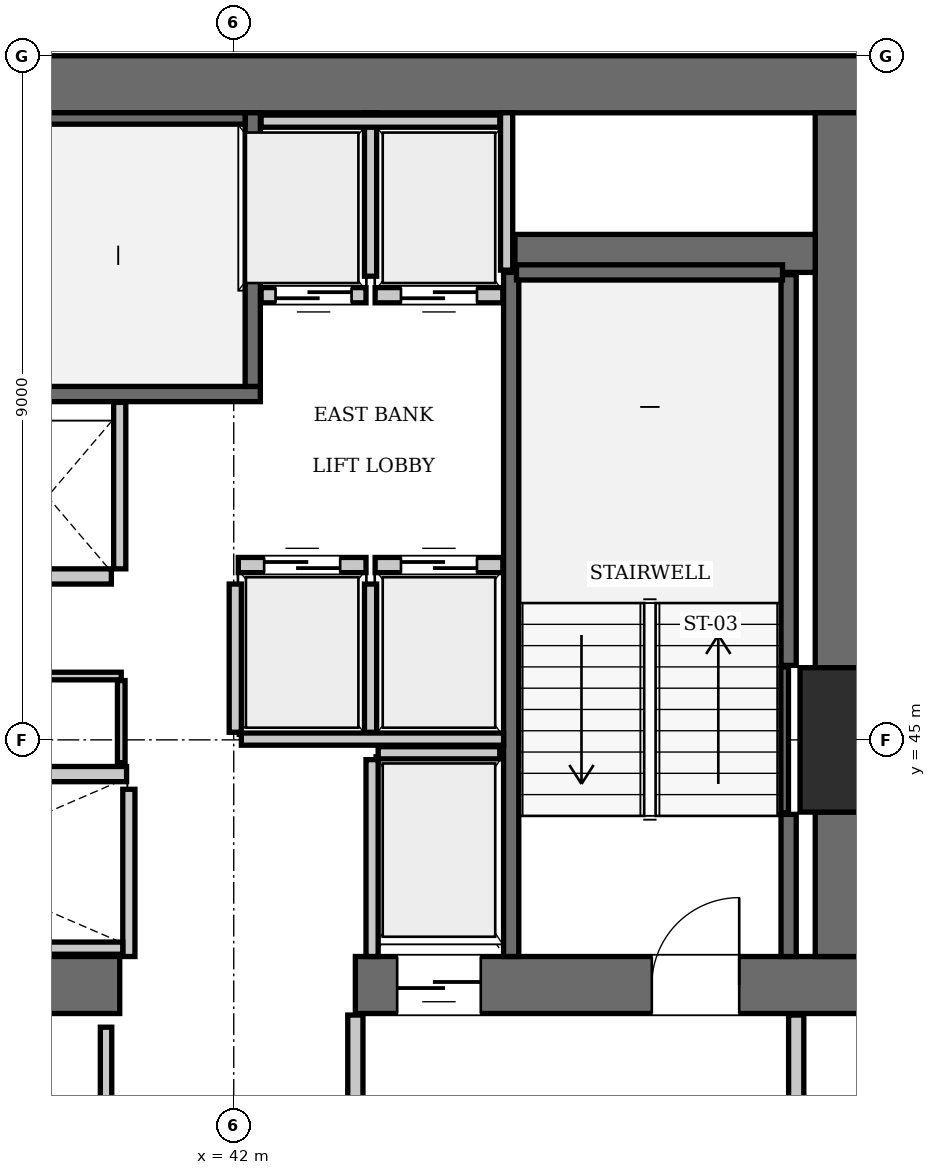
"""IFC4 building model, lengths in metres.
Left out: names, types, materials, properties, quantities, classifications, styles, units other than length and angle.
Written with IfcOpenShell. Run it as: python <this file> out.ifc"""

import sys

from ifc_helpers import new_model, si_unit, direction, frame, frame_2d, origin, origin_2d, place, context, subcontext, project, spatial, rectangle, extrude, element, fill, save


model = new_model("IFC4")
c1 = context("Model", 3, precision=1e-05, world=origin(), true_north=direction((0.0, 1.0)))
c2 = subcontext(c1, "Body", "Model", "MODEL_VIEW")
j1 = project(units=[si_unit("LENGTHUNIT", "METRE"), si_unit("PLANEANGLEUNIT", "RADIAN")], contexts=[c1])
p1 = place(None, origin())
s1 = spatial("IfcSite", under=j1, at=p1, CompositionType="ELEMENT")
p2 = place(p1, origin())
s2 = spatial("IfcBuilding", under=s1, at=p2, CompositionType="ELEMENT")
p3 = place(p2, frame((0.0, 0.0, 138.95)))
s3 = spatial("IfcBuildingStorey", under=s2, at=p3, CompositionType="ELEMENT", Elevation=138.95)
p4 = place(p3, frame((50.4, 45.0, 0.0), z_axis=(0.0, 0.0, 1.0), x_axis=(1.0, 0.0, 0.0)))
e1 = element("IfcColumn", 1, at=p4, inside=s3, PredefinedType="COLUMN", context=c2, shape_type="SweptSolid", body=[
    extrude(rectangle(XDim=1.9, YDim=1.9, at=origin_2d()), origin(), (0.0, 0.0, 1.0), 3.85),
])
p5 = place(p3, frame((25.2, 53.625, 0.0), z_axis=(0.0, 0.0, 1.0), x_axis=(1.0, 0.0, 0.0)))
e2 = element("IfcWall", 2, at=p5, inside=s3, PredefinedType="SHEAR", context=c2, shape_type="SweptSolid", body=[
    extrude(rectangle(XDim=25.2, YDim=0.75, at=frame_2d((12.6, 0.0))), origin(), (0.0, 0.0, 1.0), 3.85),
])
p6 = place(p3, frame((35.1, 41.775, 0.0), z_axis=(0.0, 0.0, 1.0), x_axis=(1.0, 0.0, 0.0)))
e3 = element("IfcWall", 3, at=p6, inside=s3, PredefinedType="SHEAR", context=c2, shape_type="SweptSolid", body=[
    extrude(rectangle(XDim=5.4, YDim=0.75, at=frame_2d((2.7, 0.0))), origin(), (0.0, 0.0, 1.0), 3.85),
])
p7 = place(p3, frame((43.6, 41.775, 0.0), z_axis=(0.0, 0.0, 1.0), x_axis=(1.0, 0.0, 0.0)))
e4 = element("IfcWall", 4, at=p7, inside=s3, PredefinedType="SHEAR", context=c2, shape_type="SweptSolid", body=[
    extrude(rectangle(XDim=6.8, YDim=0.75, at=frame_2d((3.4, 0.0))), origin(), (0.0, 0.0, 1.0), 3.85),
])
p8 = place(p7, frame((3.9, 0.0, 0.0)))
e5 = element("IfcOpeningElement", 5, at=p8, cuts=e4, PredefinedType="OPENING", context=c2, shape_type="SweptSolid", body=[
    extrude(rectangle(XDim=1.15, YDim=2.15, at=frame_2d((0.575, 1.075))), frame((0.0, 0.385, 0.0), z_axis=(0.0, -1.0, 0.0), x_axis=(1.0, 0.0, 0.0)), (0.0, 0.0, 1.0), 0.77),
])
p9 = place(p7, frame((0.55, 0.0, 0.0)))
e6 = element("IfcOpeningElement", 6, at=p9, cuts=e4, PredefinedType="OPENING", context=c2, shape_type="SweptSolid", body=[
    extrude(rectangle(XDim=1.1, YDim=2.2, at=frame_2d((0.55, 1.1))), frame((0.0, 0.385, 0.0), z_axis=(0.0, -1.0, 0.0), x_axis=(1.0, 0.0, 0.0)), (0.0, 0.0, 1.0), 0.77),
])
p10 = place(p3, frame((50.025, 42.15, 0.0), z_axis=(0.0, 0.0, 1.0), x_axis=(0.0, 1.0, 0.0)))
e7 = element("IfcWall", 7, at=p10, inside=s3, PredefinedType="SHEAR", context=c2, shape_type="SweptSolid", body=[
    extrude(rectangle(XDim=1.9, YDim=0.75, at=frame_2d((0.95, 0.0))), origin(), (0.0, 0.0, 1.0), 3.85),
])
p11 = place(p3, frame((50.025, 45.95, 0.0), z_axis=(0.0, 0.0, 1.0), x_axis=(0.0, 1.0, 0.0)))
e8 = element("IfcWall", 8, at=p11, inside=s3, PredefinedType="SHEAR", context=c2, shape_type="SweptSolid", body=[
    extrude(rectangle(XDim=7.3, YDim=0.75, at=frame_2d((3.65, 0.0))), origin(), (0.0, 0.0, 1.0), 3.85),
])
p12 = place(p3, frame((45.7, 51.4, 0.0), z_axis=(0.0, 0.0, 1.0), x_axis=(1.0, 0.0, 0.0)))
e9 = element("IfcWall", 9, at=p12, inside=s3, PredefinedType="SHEAR", context=c2, shape_type="SweptSolid", body=[
    extrude(rectangle(XDim=3.95, YDim=0.5, at=frame_2d((1.975, 0.0))), origin(), (0.0, 0.0, 1.0), 3.85),
])
p13 = place(p3, frame((33.25, 49.55, 0.0), z_axis=(0.0, 0.0, 1.0), x_axis=(1.0, 0.0, 0.0)))
e10 = element("IfcWall", 10, at=p13, inside=s3, PredefinedType="SOLIDWALL", context=c2, shape_type="SweptSolid", body=[
    extrude(rectangle(XDim=9.1, YDim=0.2, at=frame_2d((4.55, 0.0))), origin(), (0.0, 0.0, 1.0), 3.61),
])
p14 = place(p3, frame((42.25, 49.65, 0.0), z_axis=(0.0, 0.0, 1.0), x_axis=(0.0, 1.0, 0.0)))
e11 = element("IfcWall", 11, at=p14, inside=s3, PredefinedType="SOLIDWALL", context=c2, shape_type="SweptSolid", body=[
    extrude(rectangle(XDim=3.6, YDim=0.2, at=frame_2d((1.8, 0.0))), origin(), (0.0, 0.0, 1.0), 3.61),
])
p15 = place(p3, frame((33.45, 53.175, 0.0), z_axis=(0.0, 0.0, 1.0), x_axis=(1.0, 0.0, 0.0)))
e12 = element("IfcWall", 12, at=p15, inside=s3, PredefinedType="SOLIDWALL", context=c2, shape_type="SweptSolid", body=[
    extrude(rectangle(XDim=8.7, YDim=0.15, at=frame_2d((4.35, 0.0))), origin(), (0.0, 0.0, 1.0), 3.61),
])
p16 = place(p3, frame((45.65, 42.15, 0.0), z_axis=(0.0, 0.0, 1.0), x_axis=(0.0, 1.0, 0.0)))
e13 = element("IfcWall", 13, at=p16, inside=s3, PredefinedType="SOLIDWALL", context=c2, shape_type="SweptSolid", body=[
    extrude(rectangle(XDim=9.0, YDim=0.2, at=frame_2d((4.5, 0.0))), origin(), (0.0, 0.0, 1.0), 3.61),
])
p17 = place(p3, frame((49.3, 42.15, 0.0), z_axis=(0.0, 0.0, 1.0), x_axis=(0.0, 1.0, 0.0)))
e14 = element("IfcWall", 14, at=p17, inside=s3, PredefinedType="SOLIDWALL", context=c2, shape_type="SweptSolid", body=[
    extrude(rectangle(XDim=1.87, YDim=0.2, at=frame_2d((0.935, 0.0))), origin(), (0.0, 0.0, 1.0), 3.61),
])
p18 = place(p3, frame((49.3, 45.98, 0.0), z_axis=(0.0, 0.0, 1.0), x_axis=(0.0, 1.0, 0.0)))
e15 = element("IfcWall", 15, at=p18, inside=s3, PredefinedType="SOLIDWALL", context=c2, shape_type="SweptSolid", body=[
    extrude(rectangle(XDim=5.14, YDim=0.2, at=frame_2d((2.57, 0.0))), origin(), (0.0, 0.0, 1.0), 3.61),
])
p19 = place(p3, frame((45.72, 51.15, 0.0), z_axis=(0.0, 0.0, 1.0), x_axis=(1.0, 0.0, 0.0)))
e16 = element("IfcWall", 16, at=p19, inside=s3, PredefinedType="SOLIDWALL", context=c2, shape_type="SweptSolid", body=[
    extrude(rectangle(XDim=3.5, YDim=0.2, at=frame_2d((1.75, 0.0))), origin(), (0.0, 0.0, 1.0), 3.61),
])
p20 = place(p3, frame((49.248, 44.04, 0.0), z_axis=(0.0, 0.0, 1.0), x_axis=(0.0, 1.0, 0.0)))
e17 = element("IfcWall", 17, at=p20, inside=s3, PredefinedType="SOLIDWALL", context=c2, shape_type="SweptSolid", body=[
    extrude(rectangle(XDim=1.92, YDim=0.1, at=frame_2d((0.96, 0.0))), origin(), (0.0, 0.0, 1.0), 3.61),
])
p21 = place(p3, frame((42.06, 47.3, 0.0), z_axis=(0.0, 0.0, 1.0), x_axis=(1.0, 0.0, 0.0)))
e18 = element("IfcWall", 18, at=p21, inside=s3, PredefinedType="SOLIDWALL", context=c2, shape_type="SweptSolid", body=[
    extrude(rectangle(XDim=1.68, YDim=0.2, at=frame_2d((0.84, 0.0))), origin(), (0.0, 0.0, 1.0), 3.61),
])
p22 = place(p21, frame((0.34, 0.0, 0.0)))
e19 = element("IfcOpeningElement", 19, at=p22, cuts=e18, PredefinedType="OPENING", context=c2, shape_type="SweptSolid", body=[
    extrude(rectangle(XDim=1.0, YDim=2.15, at=frame_2d((0.5, 1.075))), frame((0.0, 0.11, 0.0), z_axis=(0.0, -1.0, 0.0), x_axis=(1.0, 0.0, 0.0)), (0.0, 0.0, 1.0), 0.22),
])
p23 = place(p3, frame((43.86, 47.3, 0.0), z_axis=(0.0, 0.0, 1.0), x_axis=(1.0, 0.0, 0.0)))
e20 = element("IfcWall", 20, at=p23, inside=s3, PredefinedType="SOLIDWALL", context=c2, shape_type="SweptSolid", body=[
    extrude(rectangle(XDim=1.68, YDim=0.2, at=frame_2d((0.84, 0.0))), origin(), (0.0, 0.0, 1.0), 3.61),
])
p24 = place(p23, frame((0.34, 0.0, 0.0)))
e21 = element("IfcOpeningElement", 21, at=p24, cuts=e20, PredefinedType="OPENING", context=c2, shape_type="SweptSolid", body=[
    extrude(rectangle(XDim=1.0, YDim=2.15, at=frame_2d((0.5, 1.075))), frame((0.0, 0.11, 0.0), z_axis=(0.0, -1.0, 0.0), x_axis=(1.0, 0.0, 0.0)), (0.0, 0.0, 1.0), 0.22),
])
p25 = place(p3, frame((42.36, 50.85, 0.0), z_axis=(0.0, 0.0, 1.0), x_axis=(1.0, 0.0, 0.0)))
e22 = element("IfcWall", 22, at=p25, inside=s3, PredefinedType="SOLIDWALL", context=c2, shape_type="SweptSolid", body=[
    extrude(rectangle(XDim=1.38, YDim=0.2, at=frame_2d((0.69, 0.0))), origin(), (0.0, 0.0, 1.0), 3.61),
])
p26 = place(p25, frame((0.19, 0.0, 0.0)))
e23 = element("IfcOpeningElement", 23, at=p26, cuts=e22, PredefinedType="OPENING", context=c2, shape_type="SweptSolid", body=[
    extrude(rectangle(XDim=1.0, YDim=2.15, at=frame_2d((0.5, 1.075))), frame((0.0, 0.11, 0.0), z_axis=(0.0, -1.0, 0.0), x_axis=(1.0, 0.0, 0.0)), (0.0, 0.0, 1.0), 0.22),
])
p27 = place(p3, frame((43.86, 50.85, 0.0), z_axis=(0.0, 0.0, 1.0), x_axis=(1.0, 0.0, 0.0)))
e24 = element("IfcWall", 24, at=p27, inside=s3, PredefinedType="SOLIDWALL", context=c2, shape_type="SweptSolid", body=[
    extrude(rectangle(XDim=1.68, YDim=0.2, at=frame_2d((0.84, 0.0))), origin(), (0.0, 0.0, 1.0), 3.61),
])
p28 = place(p27, frame((0.34, 0.0, 0.0)))
e25 = element("IfcOpeningElement", 25, at=p28, cuts=e24, PredefinedType="OPENING", context=c2, shape_type="SweptSolid", body=[
    extrude(rectangle(XDim=1.0, YDim=2.15, at=frame_2d((0.5, 1.075))), frame((0.0, 0.11, 0.0), z_axis=(0.0, -1.0, 0.0), x_axis=(1.0, 0.0, 0.0)), (0.0, 0.0, 1.0), 0.22),
])
p29 = place(p3, frame((38.91, 44.55, 0.0), z_axis=(0.0, 0.0, 1.0), x_axis=(1.0, 0.0, 0.0)))
e26 = element("IfcWall", 26, at=p29, inside=s3, PredefinedType="SOLIDWALL", context=c2, shape_type="SweptSolid", body=[
    extrude(rectangle(XDim=1.68, YDim=0.2, at=frame_2d((0.84, 0.0))), origin(), (0.0, 0.0, 1.0), 3.61),
])
p30 = place(p3, frame((38.71, 47.15, 0.0), z_axis=(0.0, 0.0, 1.0), x_axis=(1.0, 0.0, 0.0)))
e27 = element("IfcWall", 27, at=p30, inside=s3, PredefinedType="SOLIDWALL", context=c2, shape_type="SweptSolid", body=[
    extrude(rectangle(XDim=1.68, YDim=0.2, at=frame_2d((0.84, 0.0))), origin(), (0.0, 0.0, 1.0), 3.61),
])
p31 = place(p3, frame((43.9, 44.83, 0.0), z_axis=(0.0, 0.0, 1.0), x_axis=(1.0, 0.0, 0.0)))
e28 = element("IfcWall", 28, at=p31, inside=s3, PredefinedType="SOLIDWALL", context=c2, shape_type="SweptSolid", body=[
    extrude(rectangle(XDim=1.6, YDim=0.16, at=frame_2d((0.8, 0.0))), origin(), (0.0, 0.0, 1.0), 3.61),
])
p32 = place(p3, frame((43.82, 42.15, 0.0), z_axis=(0.0, 0.0, 1.0), x_axis=(0.0, 1.0, 0.0)))
e29 = element("IfcWall", 29, at=p32, inside=s3, PredefinedType="SOLIDWALL", context=c2, shape_type="SweptSolid", body=[
    extrude(rectangle(XDim=2.59, YDim=0.16, at=frame_2d((1.295, 0.0))), origin(), (0.0, 0.0, 1.0), 3.61),
])
for number, where, z_axis, x_axis in (
    (30, (42.02, 45.1, 0.0), (0.0, 0.0, 1.0), (0.0, 1.0, 0.0)),
    (31, (43.8, 45.1, 0.0), (0.0, 0.0, 1.0), (0.0, 1.0, 0.0)),
):
    element("IfcWall", number, at=place(p3, frame(where, z_axis=z_axis, x_axis=x_axis)), inside=s3, PredefinedType="SOLIDWALL", context=c2, shape_type="SweptSolid", body=[
        extrude(rectangle(XDim=1.95, YDim=0.16, at=frame_2d((0.975, 0.0))), origin(), (0.0, 0.0, 1.0), 3.61),
    ])
p33 = place(p3, frame((42.1, 45.01, 0.0), z_axis=(0.0, 0.0, 1.0), x_axis=(1.0, 0.0, 0.0)))
e32 = element("IfcWall", 32, at=p33, inside=s3, PredefinedType="SOLIDWALL", context=c2, shape_type="SweptSolid", body=[
    extrude(rectangle(XDim=3.45, YDim=0.16, at=frame_2d((1.725, 0.0))), origin(), (0.0, 0.0, 1.0), 3.61),
])
p34 = place(p3, frame((45.59, 51.18, 0.0), z_axis=(0.0, 0.0, 1.0), x_axis=(0.0, 1.0, 0.0)))
e33 = element("IfcWall", 33, at=p34, inside=s3, PredefinedType="SOLIDWALL", context=c2, shape_type="SweptSolid", body=[
    extrude(rectangle(XDim=2.07, YDim=0.16, at=frame_2d((1.035, 0.0))), origin(), (0.0, 0.0, 1.0), 3.61),
])
p35 = place(p3, frame((43.8, 51.1, 0.0), z_axis=(0.0, 0.0, 1.0), x_axis=(0.0, 1.0, 0.0)))
e34 = element("IfcWall", 34, at=p35, inside=s3, PredefinedType="SOLIDWALL", context=c2, shape_type="SweptSolid", body=[
    extrude(rectangle(XDim=2.15, YDim=0.16, at=frame_2d((1.075, 0.0))), origin(), (0.0, 0.0, 1.0), 3.61),
])
p36 = place(p3, frame((42.36, 53.14, 0.0), z_axis=(0.0, 0.0, 1.0), x_axis=(1.0, 0.0, 0.0)))
e35 = element("IfcWall", 35, at=p36, inside=s3, PredefinedType="SOLIDWALL", context=c2, shape_type="SweptSolid", body=[
    extrude(rectangle(XDim=3.14, YDim=0.16, at=frame_2d((1.57, 0.0))), origin(), (0.0, 0.0, 1.0), 3.61),
])
p37 = place(p3, frame((40.62, 42.15, 0.0), z_axis=(0.0, 0.0, 1.0), x_axis=(0.0, 1.0, 0.0)))
e36 = element("IfcWall", 36, at=p37, inside=s3, PredefinedType="SOLIDWALL", context=c2, shape_type="SweptSolid", body=[
    extrude(rectangle(XDim=2.2, YDim=0.16, at=frame_2d((1.1, 0.0))), origin(), (0.0, 0.0, 1.0), 3.61),
])
p38 = place(p3, frame((35.52, 42.26, 0.0), z_axis=(0.0, 0.0, 1.0), x_axis=(1.0, 0.0, 0.0)))
e37 = element("IfcWall", 37, at=p38, inside=s3, PredefinedType="SOLIDWALL", context=c2, shape_type="SweptSolid", body=[
    extrude(rectangle(XDim=5.02, YDim=0.16, at=frame_2d((2.51, 0.0))), origin(), (0.0, 0.0, 1.0), 3.61),
])
p39 = place(p3, frame((40.5, 47.25, 0.0), z_axis=(0.0, 0.0, 1.0), x_axis=(0.0, 1.0, 0.0)))
e38 = element("IfcWall", 38, at=p39, inside=s3, PredefinedType="SOLIDWALL", context=c2, shape_type="SweptSolid", body=[
    extrude(rectangle(XDim=2.19, YDim=0.16, at=frame_2d((1.095, 0.0))), origin(), (0.0, 0.0, 1.0), 3.61),
])
for number, where, z_axis, x_axis in (
    (39, (43.6, 38.31, 0.0), (0.0, 0.0, 1.0), (0.0, 1.0, 0.0)),
    (40, (49.4, 38.31, 0.0), (0.0, 0.0, 1.0), (0.0, 1.0, 0.0)),
):
    element("IfcWall", number, at=place(p3, frame(where, z_axis=z_axis, x_axis=x_axis)), inside=s3, PredefinedType="PARTITIONING", context=c2, shape_type="SweptSolid", body=[
        extrude(rectangle(XDim=3.07, YDim=0.2, at=frame_2d((1.535, 0.0))), origin(), (0.0, 0.0, 1.0), 3.61),
    ])
p40 = place(p3, frame((35.58, 45.84, 0.0), z_axis=(0.0, 0.0, 1.0), x_axis=(1.0, 0.0, 0.0)))
e41 = element("IfcWall", 41, at=p40, inside=s3, PredefinedType="PARTITIONING", context=c2, shape_type="SweptSolid", body=[
    extrude(rectangle(XDim=4.94, YDim=0.1, at=frame_2d((2.47, 0.0))), origin(), (0.0, 0.0, 1.0), 3.61),
])
p41 = place(p40, frame((1.8, 0.0, 0.0)))
e42 = element("IfcOpeningElement", 42, at=p41, cuts=e41, PredefinedType="OPENING", context=c2, shape_type="SweptSolid", body=[
    extrude(rectangle(XDim=0.8, YDim=2.05, at=frame_2d((0.4, 1.025))), frame((0.0, 0.06, 0.0), z_axis=(0.0, -1.0, 0.0), x_axis=(1.0, 0.0, 0.0)), (0.0, 0.0, 1.0), 0.12),
])
p42 = place(p3, frame((40.52, 44.7, 0.0), z_axis=(0.0, 0.0, 1.0), x_axis=(0.0, 1.0, 0.0)))
e43 = element("IfcWall", 43, at=p42, inside=s3, PredefinedType="PARTITIONING", context=c2, shape_type="SweptSolid", body=[
    extrude(rectangle(XDim=1.08, YDim=0.1, at=frame_2d((0.54, 0.0))), origin(), (0.0, 0.0, 1.0), 3.61),
])
p43 = place(p3, frame((40.32, 38.38, 0.0), z_axis=(0.0, 0.0, 1.0), x_axis=(0.0, 1.0, 0.0)))
e44 = element("IfcWall", 44, at=p43, inside=s3, PredefinedType="PARTITIONING", context=c2, shape_type="SweptSolid", body=[
    extrude(rectangle(XDim=2.84, YDim=0.15, at=frame_2d((1.42, 0.0))), origin(), (0.0, 0.0, 1.0), 3.61),
])
p44 = place(p8, origin())
e45 = element("IfcDoor", 45, at=p44, inside=s3, OperationType="SINGLE_SWING_RIGHT", PredefinedType="DOOR", context=c2, shape_type="SweptSolid", body=[
    extrude(rectangle(XDim=1.15, YDim=2.15, at=frame_2d((0.575, 1.075))), frame((0.0, 0.025, 0.0), z_axis=(0.0, -1.0, 0.0), x_axis=(1.0, 0.0, 0.0)), (0.0, 0.0, 1.0), 0.05),
])
fill(e5, e45)
p45 = place(p22, origin())
e46 = element("IfcDoor", 46, at=p45, inside=s3, OperationType="SLIDING_TO_LEFT", PredefinedType="DOOR", context=c2, shape_type="SweptSolid", body=[
    extrude(rectangle(XDim=1.0, YDim=2.15, at=frame_2d((0.5, 1.075))), frame((0.0, 0.025, 0.0), z_axis=(0.0, -1.0, 0.0), x_axis=(1.0, 0.0, 0.0)), (0.0, 0.0, 1.0), 0.05),
])
fill(e19, e46)
p46 = place(p24, origin())
e47 = element("IfcDoor", 47, at=p46, inside=s3, OperationType="SLIDING_TO_LEFT", PredefinedType="DOOR", context=c2, shape_type="SweptSolid", body=[
    extrude(rectangle(XDim=1.0, YDim=2.15, at=frame_2d((0.5, 1.075))), frame((0.0, 0.025, 0.0), z_axis=(0.0, -1.0, 0.0), x_axis=(1.0, 0.0, 0.0)), (0.0, 0.0, 1.0), 0.05),
])
fill(e21, e47)
p47 = place(p26, frame((1.0, 0.0, 0.0), z_axis=(0.0, 0.0, 1.0), x_axis=(-1.0, 0.0, 0.0)))
e48 = element("IfcDoor", 48, at=p47, inside=s3, OperationType="SLIDING_TO_LEFT", PredefinedType="DOOR", context=c2, shape_type="SweptSolid", body=[
    extrude(rectangle(XDim=1.0, YDim=2.15, at=frame_2d((0.5, 1.075))), frame((0.0, 0.025, 0.0), z_axis=(0.0, -1.0, 0.0), x_axis=(1.0, 0.0, 0.0)), (0.0, 0.0, 1.0), 0.05),
])
fill(e23, e48)
p48 = place(p28, frame((1.0, 0.0, 0.0), z_axis=(0.0, 0.0, 1.0), x_axis=(-1.0, 0.0, 0.0)))
e49 = element("IfcDoor", 49, at=p48, inside=s3, OperationType="SLIDING_TO_LEFT", PredefinedType="DOOR", context=c2, shape_type="SweptSolid", body=[
    extrude(rectangle(XDim=1.0, YDim=2.15, at=frame_2d((0.5, 1.075))), frame((0.0, 0.025, 0.0), z_axis=(0.0, -1.0, 0.0), x_axis=(1.0, 0.0, 0.0)), (0.0, 0.0, 1.0), 0.05),
])
fill(e25, e49)
p49 = place(p9, frame((1.1, 0.0, 0.0), z_axis=(0.0, 0.0, 1.0), x_axis=(-1.0, 0.0, 0.0)))
e50 = element("IfcDoor", 50, at=p49, inside=s3, OperationType="SLIDING_TO_LEFT", PredefinedType="DOOR", context=c2, shape_type="SweptSolid", body=[
    extrude(rectangle(XDim=1.1, YDim=2.2, at=frame_2d((0.55, 1.1))), frame((0.0, 0.025, 0.0), z_axis=(0.0, -1.0, 0.0), x_axis=(1.0, 0.0, 0.0)), (0.0, 0.0, 1.0), 0.05),
])
fill(e6, e50)
save(model, sys.argv[1])
